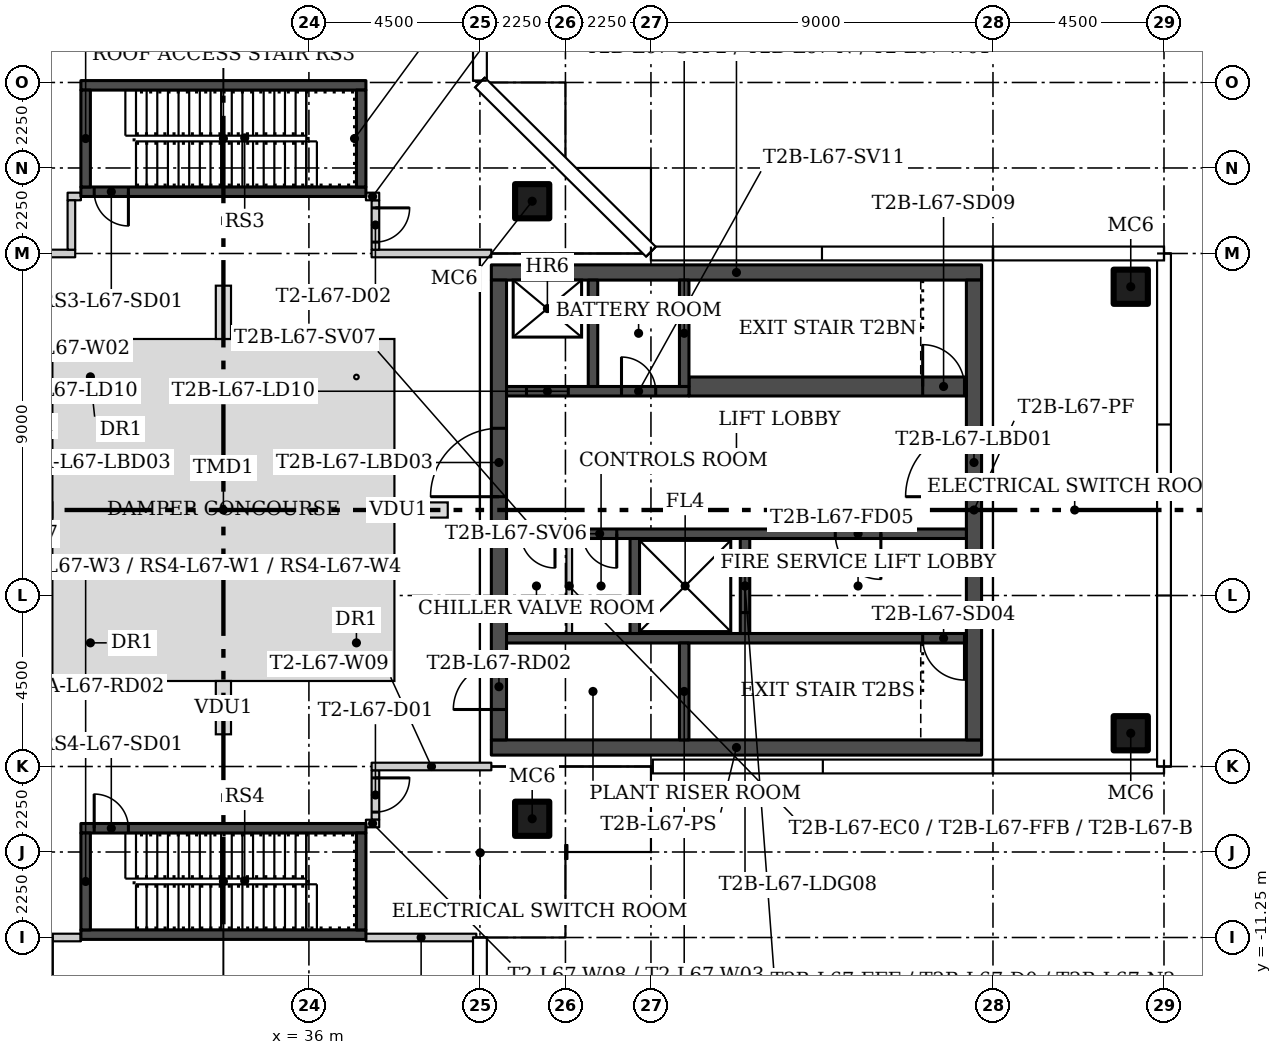
"""IFC4 building model, lengths in metres.
Left out: names, types, materials, properties, quantities, classifications, styles, units other than length and angle.
Written with IfcOpenShell. Run it as: python <this file> out.ifc"""

import sys

from ifc_helpers import new_model, si_unit, direction, frame, frame_2d, origin, origin_2d, place, context, subcontext, project, spatial, rectangle, hollow_rectangle, extrude, element, fill, save


model = new_model("IFC4")
c1 = context("Model", 3, precision=1e-05, world=origin(), true_north=direction((0.0, 1.0)))
c2 = subcontext(c1, "Body", "Model", "MODEL_VIEW")
j1 = project(units=[si_unit("LENGTHUNIT", "METRE"), si_unit("PLANEANGLEUNIT", "RADIAN")], contexts=[c1])
p1 = place(None, origin())
s1 = spatial("IfcSite", under=j1, at=p1, CompositionType="ELEMENT")
p2 = place(p1, origin())
s2 = spatial("IfcBuilding", under=s1, at=p2, CompositionType="ELEMENT")
p3 = place(p2, frame((0.0, 0.0, 278.3)))
s3 = spatial("IfcBuildingStorey", under=s2, at=p3, CompositionType="ELEMENT", Elevation=278.3)
for number, where in (
    (1, (41.875, 8.125, 0.0)),
    (2, (41.875, -8.125, 0.0)),
    (3, (57.625, -5.875, 0.0)),
    (4, (57.625, 5.875, 0.0)),
):
    element("IfcColumn", number, at=place(p3, frame(where)), inside=s3, PredefinedType="COLUMN", context=c2, shape_type="SweptSolid", body=[
        extrude(hollow_rectangle(XDim=0.9, YDim=0.9, WallThickness=0.036, at=origin_2d()), origin(), (0.0, 0.0, 1.0), 5.55),
    ])
for number, where in (
    (5, (37.65, 6.75, 0.0)),
    (6, (26.7, 6.75, 0.0)),
):
    element("IfcWall", number, at=place(p3, frame(where)), inside=s3, PredefinedType="PARTITIONING", context=c2, shape_type="SweptSolid", body=[
        extrude(rectangle(XDim=3.15, YDim=0.2, at=frame_2d((1.575, 0.0))), origin(), (0.0, 0.0, 1.0), 5.55),
    ])
p4 = place(p3, frame((37.75, -6.85, 0.0), z_axis=(0.0, 0.0, 1.0), x_axis=(0.0, -1.0, 0.0)))
e7 = element("IfcWall", 7, at=p4, inside=s3, PredefinedType="PARTITIONING", context=c2, shape_type="SweptSolid", body=[
    extrude(rectangle(XDim=1.3, YDim=0.2, at=frame_2d((0.65, 0.0))), origin(), (0.0, 0.0, 1.0), 5.55),
])
p5 = place(p4, frame((0.2, 0.0, 0.0)))
e8 = element("IfcOpeningElement", 8, at=p5, cuts=e7, PredefinedType="OPENING", context=c2, shape_type="SweptSolid", body=[
    extrude(rectangle(XDim=0.9, YDim=2.4, at=frame_2d((0.45, 1.2))), frame((0.0, 0.11, 0.0), z_axis=(0.0, -1.0, 0.0), x_axis=(1.0, 0.0, 0.0)), (0.0, 0.0, 1.0), 0.22),
])
p6 = place(p3, frame((37.75, 8.15, 0.0), z_axis=(0.0, 0.0, 1.0), x_axis=(0.0, -1.0, 0.0)))
e9 = element("IfcWall", 9, at=p6, inside=s3, PredefinedType="PARTITIONING", context=c2, shape_type="SweptSolid", body=[
    extrude(rectangle(XDim=1.3, YDim=0.2, at=frame_2d((0.65, 0.0))), origin(), (0.0, 0.0, 1.0), 5.55),
])
p7 = place(p6, frame((0.2, 0.0, 0.0)))
e10 = element("IfcOpeningElement", 10, at=p7, cuts=e9, PredefinedType="OPENING", context=c2, shape_type="SweptSolid", body=[
    extrude(rectangle(XDim=0.9, YDim=2.4, at=frame_2d((0.45, 1.2))), frame((0.0, 0.11, 0.0), z_axis=(0.0, -1.0, 0.0), x_axis=(1.0, 0.0, 0.0)), (0.0, 0.0, 1.0), 0.22),
])
for number, where in (
    (11, (37.5, 8.25, 0.0)),
    (12, (29.65, 8.25, 0.0)),
):
    element("IfcWall", number, at=place(p3, frame(where)), inside=s3, PredefinedType="PARTITIONING", context=c2, shape_type="SweptSolid", body=[
        extrude(rectangle(XDim=0.35, YDim=0.2, at=frame_2d((0.175, 0.0))), origin(), (0.0, 0.0, 1.0), 5.55),
    ])
p8 = place(p3, frame((29.75, 6.85, 0.0), z_axis=(0.0, 0.0, 1.0), x_axis=(0.0, 1.0, 0.0)))
e13 = element("IfcWall", 13, at=p8, inside=s3, PredefinedType="PARTITIONING", context=c2, shape_type="SweptSolid", body=[
    extrude(rectangle(XDim=1.3, YDim=0.2, at=frame_2d((0.65, 0.0))), origin(), (0.0, 0.0, 1.0), 5.55),
])
p9 = place(p3, frame((37.85, -8.25, 0.0), z_axis=(0.0, 0.0, 1.0), x_axis=(-1.0, 0.0, 0.0)))
e14 = element("IfcWall", 14, at=p9, inside=s3, PredefinedType="PARTITIONING", context=c2, shape_type="SweptSolid", body=[
    extrude(rectangle(XDim=0.35, YDim=0.2, at=frame_2d((0.175, 0.0))), origin(), (0.0, 0.0, 1.0), 5.55),
])
p10 = place(p3, frame((40.8, -6.75, 0.0), z_axis=(0.0, 0.0, 1.0), x_axis=(-1.0, 0.0, 0.0)))
e15 = element("IfcWall", 15, at=p10, inside=s3, PredefinedType="PARTITIONING", context=c2, shape_type="SweptSolid", body=[
    extrude(rectangle(XDim=3.15, YDim=0.2, at=frame_2d((1.575, 0.0))), origin(), (0.0, 0.0, 1.0), 5.55),
])
p11 = place(p3, frame((30.0, -11.25, 0.0), z_axis=(0.0, 0.0, 1.0), x_axis=(-1.0, 0.0, 0.0)))
e16 = element("IfcWall", 16, at=p11, inside=s3, PredefinedType="PARTITIONING", context=c2, shape_type="SweptSolid", body=[
    extrude(rectangle(XDim=3.005, YDim=0.2, at=frame_2d((1.502, 0.0))), origin(), (0.0, 0.0, 1.0), 5.55),
])
p12 = place(p11, frame((0.75, 0.0, 0.0)))
e17 = element("IfcOpeningElement", 17, at=p12, cuts=e16, PredefinedType="OPENING", context=c2, shape_type="SweptSolid", body=[
    extrude(rectangle(XDim=1.5, YDim=2.4, at=frame_2d((0.75, 1.2))), frame((0.0, 0.11, 0.0), z_axis=(0.0, -1.0, 0.0), x_axis=(1.0, 0.0, 0.0)), (0.0, 0.0, 1.0), 0.22),
])
p13 = place(p3, frame((37.5, -11.25, 0.0)))
e18 = element("IfcWall", 18, at=p13, inside=s3, PredefinedType="PARTITIONING", context=c2, shape_type="SweptSolid", body=[
    extrude(rectangle(XDim=2.905, YDim=0.2, at=frame_2d((1.453, 0.0))), origin(), (0.0, 0.0, 1.0), 5.55),
])
for number, where, z_axis, x_axis in (
    (19, (53.7, -6.25, 0.0), (0.0, 0.0, 1.0), (-1.0, 0.0, 0.0)),
    (20, (53.7, 6.25, 0.0), (0.0, 0.0, 1.0), (-1.0, 0.0, 0.0)),
):
    element("IfcWall", number, at=place(p3, frame(where, z_axis=z_axis, x_axis=x_axis)), inside=s3, PredefinedType="SHEAR", context=c2, shape_type="SweptSolid", body=[
        extrude(rectangle(XDim=12.9, YDim=0.4, at=frame_2d((6.45, 0.0))), origin(), (0.0, 0.0, 1.0), 5.55),
    ])
p14 = place(p3, frame((53.5, -6.05, 0.0), z_axis=(0.0, 0.0, 1.0), x_axis=(0.0, 1.0, 0.0)))
e21 = element("IfcWall", 21, at=p14, inside=s3, PredefinedType="SHEAR", context=c2, shape_type="SweptSolid", body=[
    extrude(rectangle(XDim=12.1, YDim=0.4, at=frame_2d((6.05, 0.0))), origin(), (0.0, 0.0, 1.0), 5.55),
])
p15 = place(p14, frame((6.4, 0.0, 0.0)))
e22 = element("IfcOpeningElement", 22, at=p15, cuts=e21, PredefinedType="OPENING", context=c2, shape_type="SweptSolid", body=[
    extrude(rectangle(XDim=1.8, YDim=2.4, at=frame_2d((0.9, 1.2))), frame((0.0, 0.21, 0.0), z_axis=(0.0, -1.0, 0.0), x_axis=(1.0, 0.0, 0.0)), (0.0, 0.0, 1.0), 0.42),
])
p16 = place(p3, frame((41.0, -6.05, 0.0), z_axis=(0.0, 0.0, 1.0), x_axis=(0.0, 1.0, 0.0)))
e23 = element("IfcWall", 23, at=p16, inside=s3, PredefinedType="SHEAR", context=c2, shape_type="SweptSolid", body=[
    extrude(rectangle(XDim=12.1, YDim=0.4, at=frame_2d((6.05, 0.0))), origin(), (0.0, 0.0, 1.0), 5.55),
])
p17 = place(p16, frame((0.8, 0.0, 0.0)))
e24 = element("IfcOpeningElement", 24, at=p17, cuts=e23, PredefinedType="OPENING", context=c2, shape_type="SweptSolid", body=[
    extrude(rectangle(XDim=1.2, YDim=2.1, at=frame_2d((0.6, 1.05))), frame((0.0, 0.21, 0.0), z_axis=(0.0, -1.0, 0.0), x_axis=(1.0, 0.0, 0.0)), (0.0, 0.0, 1.0), 0.42),
])
p18 = place(p16, frame((6.4, 0.0, 0.0)))
e25 = element("IfcOpeningElement", 25, at=p18, cuts=e23, PredefinedType="OPENING", context=c2, shape_type="SweptSolid", body=[
    extrude(rectangle(XDim=1.8, YDim=2.4, at=frame_2d((0.9, 1.2))), frame((0.0, 0.21, 0.0), z_axis=(0.0, -1.0, 0.0), x_axis=(1.0, 0.0, 0.0)), (0.0, 0.0, 1.0), 0.42),
])
p19 = place(p3, frame((53.3, -3.375, 0.0), z_axis=(0.0, 0.0, 1.0), x_axis=(-1.0, 0.0, 0.0)))
e26 = element("IfcWall", 26, at=p19, inside=s3, PredefinedType="SHEAR", context=c2, shape_type="SweptSolid", body=[
    extrude(rectangle(XDim=12.1, YDim=0.25, at=frame_2d((6.05, 0.0))), origin(), (0.0, 0.0, 1.0), 5.55),
])
p20 = place(p19, frame((0.05, 0.0, 0.0)))
e27 = element("IfcOpeningElement", 27, at=p20, cuts=e26, PredefinedType="OPENING", context=c2, shape_type="SweptSolid", body=[
    extrude(rectangle(XDim=1.1, YDim=2.1, at=frame_2d((0.55, 1.05))), frame((0.0, 0.135, 0.0), z_axis=(0.0, -1.0, 0.0), x_axis=(1.0, 0.0, 0.0)), (0.0, 0.0, 1.0), 0.27),
])
p21 = place(p3, frame((45.875, -6.05, 0.0), z_axis=(0.0, 0.0, 1.0), x_axis=(0.0, 1.0, 0.0)))
e28 = element("IfcWall", 28, at=p21, inside=s3, PredefinedType="SHEAR", context=c2, shape_type="SweptSolid", body=[
    extrude(rectangle(XDim=2.55, YDim=0.25, at=frame_2d((1.275, 0.0))), origin(), (0.0, 0.0, 1.0), 5.55),
])
p22 = place(p3, frame((53.3, -0.625, 0.0), z_axis=(0.0, 0.0, 1.0), x_axis=(-1.0, 0.0, 0.0)))
e29 = element("IfcWall", 29, at=p22, inside=s3, PredefinedType="SHEAR", context=c2, shape_type="SweptSolid", body=[
    extrude(rectangle(XDim=12.1, YDim=0.25, at=frame_2d((6.05, 0.0))), origin(), (0.0, 0.0, 1.0), 5.55),
])
p23 = place(p22, frame((2.25, 0.0, 0.0)))
e30 = element("IfcOpeningElement", 30, at=p23, cuts=e29, PredefinedType="OPENING", context=c2, shape_type="SweptSolid", body=[
    extrude(rectangle(XDim=1.2, YDim=2.1, at=frame_2d((0.6, 1.05))), frame((0.0, 0.135, 0.0), z_axis=(0.0, -1.0, 0.0), x_axis=(1.0, 0.0, 0.0)), (0.0, 0.0, 1.0), 0.27),
])
p24 = place(p22, frame((9.2, 0.0, 0.0)))
e31 = element("IfcOpeningElement", 31, at=p24, cuts=e29, PredefinedType="OPENING", context=c2, shape_type="SweptSolid", body=[
    extrude(rectangle(XDim=0.9, YDim=2.1, at=frame_2d((0.45, 1.05))), frame((0.0, 0.135, 0.0), z_axis=(0.0, -1.0, 0.0), x_axis=(1.0, 0.0, 0.0)), (0.0, 0.0, 1.0), 0.27),
])
p25 = place(p22, frame((10.825, 0.0, 0.0)))
e32 = element("IfcOpeningElement", 32, at=p25, cuts=e29, PredefinedType="OPENING", context=c2, shape_type="SweptSolid", body=[
    extrude(rectangle(XDim=0.9, YDim=2.1, at=frame_2d((0.45, 1.05))), frame((0.0, 0.135, 0.0), z_axis=(0.0, -1.0, 0.0), x_axis=(1.0, 0.0, 0.0)), (0.0, 0.0, 1.0), 0.27),
])
p26 = place(p3, frame((47.475, -3.25, 0.0), z_axis=(0.0, 0.0, 1.0), x_axis=(0.0, 1.0, 0.0)))
e33 = element("IfcWall", 33, at=p26, inside=s3, PredefinedType="SHEAR", context=c2, shape_type="SweptSolid", body=[
    extrude(rectangle(XDim=2.5, YDim=0.25, at=frame_2d((1.25, 0.0))), origin(), (0.0, 0.0, 1.0), 5.55),
])
p27 = place(p26, frame((0.55, 0.0, 0.0)))
e34 = element("IfcOpeningElement", 34, at=p27, cuts=e33, PredefinedType="OPENING", context=c2, shape_type="SweptSolid", body=[
    extrude(rectangle(XDim=1.4, YDim=2.4, at=frame_2d((0.7, 1.2))), frame((0.0, 0.135, 0.0), z_axis=(0.0, -1.0, 0.0), x_axis=(1.0, 0.0, 0.0)), (0.0, 0.0, 1.0), 0.27),
])
p28 = place(p3, frame((44.575, -3.25, 0.0), z_axis=(0.0, 0.0, 1.0), x_axis=(0.0, 1.0, 0.0)))
e35 = element("IfcWall", 35, at=p28, inside=s3, PredefinedType="SHEAR", context=c2, shape_type="SweptSolid", body=[
    extrude(rectangle(XDim=2.5, YDim=0.25, at=frame_2d((1.25, 0.0))), origin(), (0.0, 0.0, 1.0), 5.55),
])
p29 = place(p3, frame((42.85, -3.25, 0.0), z_axis=(0.0, 0.0, 1.0), x_axis=(0.0, 1.0, 0.0)))
e36 = element("IfcWall", 36, at=p29, inside=s3, PredefinedType="PARTITIONING", context=c2, shape_type="SweptSolid", body=[
    extrude(rectangle(XDim=2.5, YDim=0.15, at=frame_2d((1.25, 0.0))), origin(), (0.0, 0.0, 1.0), 5.55),
])
p30 = place(p3, frame((46.0, 3.25, 0.0)))
e37 = element("IfcWall", 37, at=p30, inside=s3, PredefinedType="SHEAR", context=c2, shape_type="SweptSolid", body=[
    extrude(rectangle(XDim=7.3, YDim=0.5, at=frame_2d((3.65, 0.0))), origin(), (0.0, 0.0, 1.0), 5.55),
])
p31 = place(p30, frame((6.15, 0.0, 0.0)))
e38 = element("IfcOpeningElement", 38, at=p31, cuts=e37, PredefinedType="OPENING", context=c2, shape_type="SweptSolid", body=[
    extrude(rectangle(XDim=1.1, YDim=2.1, at=frame_2d((0.55, 1.05))), frame((0.0, 0.26, 0.0), z_axis=(0.0, -1.0, 0.0), x_axis=(1.0, 0.0, 0.0)), (0.0, 0.0, 1.0), 0.52),
])
p32 = place(p3, frame((41.2, 3.125, 0.0)))
e39 = element("IfcWall", 39, at=p32, inside=s3, PredefinedType="SHEAR", context=c2, shape_type="SweptSolid", body=[
    extrude(rectangle(XDim=4.8, YDim=0.25, at=frame_2d((2.4, 0.0))), origin(), (0.0, 0.0, 1.0), 5.55),
])
p33 = place(p32, frame((0.525, 0.0, 0.0)))
e40 = element("IfcOpeningElement", 40, at=p33, cuts=e39, PredefinedType="OPENING", context=c2, shape_type="SweptSolid", body=[
    extrude(rectangle(XDim=1.1, YDim=2.1, at=frame_2d((0.55, 1.05))), frame((0.0, 0.135, 0.0), z_axis=(0.0, -1.0, 0.0), x_axis=(1.0, 0.0, 0.0)), (0.0, 0.0, 1.0), 0.27),
])
p34 = place(p32, frame((3.025, 0.0, 0.0)))
e41 = element("IfcOpeningElement", 41, at=p34, cuts=e39, PredefinedType="OPENING", context=c2, shape_type="SweptSolid", body=[
    extrude(rectangle(XDim=0.9, YDim=2.1, at=frame_2d((0.45, 1.05))), frame((0.0, 0.135, 0.0), z_axis=(0.0, -1.0, 0.0), x_axis=(1.0, 0.0, 0.0)), (0.0, 0.0, 1.0), 0.27),
])
for number, where, z_axis, x_axis in (
    (42, (45.875, 3.25, 0.0), (0.0, 0.0, 1.0), (0.0, 1.0, 0.0)),
    (43, (43.475, 3.25, 0.0), (0.0, 0.0, 1.0), (0.0, 1.0, 0.0)),
):
    element("IfcWall", number, at=place(p3, frame(where, z_axis=z_axis, x_axis=x_axis)), inside=s3, PredefinedType="SHEAR", context=c2, shape_type="SweptSolid", body=[
        extrude(rectangle(XDim=2.8, YDim=0.25, at=frame_2d((1.4, 0.0))), origin(), (0.0, 0.0, 1.0), 5.55),
    ])
p35 = place(p3, frame((37.5, 8.375, 0.0), z_axis=(0.0, 0.0, 1.0), x_axis=(-1.0, 0.0, 0.0)))
e44 = element("IfcWall", 44, at=p35, inside=s3, PredefinedType="SHEAR", context=c2, shape_type="SweptSolid", body=[
    extrude(rectangle(XDim=7.5, YDim=0.25, at=frame_2d((3.75, 0.0))), origin(), (0.0, 0.0, 1.0), 5.55),
])
p36 = place(p35, frame((6.25, 0.0, 0.0)))
e45 = element("IfcOpeningElement", 45, at=p36, cuts=e44, PredefinedType="OPENING", context=c2, shape_type="SweptSolid", body=[
    extrude(rectangle(XDim=0.9, YDim=2.1, at=frame_2d((0.45, 1.05))), frame((0.0, 0.135, 0.0), z_axis=(0.0, -1.0, 0.0), x_axis=(1.0, 0.0, 0.0)), (0.0, 0.0, 1.0), 0.27),
])
p37 = place(p3, frame((30.0, 11.175, 0.0)))
e46 = element("IfcWall", 46, at=p37, inside=s3, PredefinedType="SHEAR", context=c2, shape_type="SweptSolid", body=[
    extrude(rectangle(XDim=7.5, YDim=0.25, at=frame_2d((3.75, 0.0))), origin(), (0.0, 0.0, 1.0), 5.55),
])
for number, where, z_axis, x_axis in (
    (47, (30.125, 8.5, 0.0), (0.0, 0.0, 1.0), (0.0, 1.0, 0.0)),
    (48, (37.375, 8.5, 0.0), (0.0, 0.0, 1.0), (0.0, 1.0, 0.0)),
):
    element("IfcWall", number, at=place(p3, frame(where, z_axis=z_axis, x_axis=x_axis)), inside=s3, PredefinedType="SHEAR", context=c2, shape_type="SweptSolid", body=[
        extrude(rectangle(XDim=2.55, YDim=0.25, at=frame_2d((1.275, 0.0))), origin(), (0.0, 0.0, 1.0), 5.55),
    ])
p38 = place(p3, frame((30.0, -8.375, 0.0)))
e49 = element("IfcWall", 49, at=p38, inside=s3, PredefinedType="SHEAR", context=c2, shape_type="SweptSolid", body=[
    extrude(rectangle(XDim=7.5, YDim=0.25, at=frame_2d((3.75, 0.0))), origin(), (0.0, 0.0, 1.0), 5.55),
])
p39 = place(p38, frame((0.35, 0.0, 0.0)))
e50 = element("IfcOpeningElement", 50, at=p39, cuts=e49, PredefinedType="OPENING", context=c2, shape_type="SweptSolid", body=[
    extrude(rectangle(XDim=0.9, YDim=2.1, at=frame_2d((0.45, 1.05))), frame((0.0, 0.135, 0.0), z_axis=(0.0, -1.0, 0.0), x_axis=(1.0, 0.0, 0.0)), (0.0, 0.0, 1.0), 0.27),
])
p40 = place(p3, frame((30.0, -11.175, 0.0)))
e51 = element("IfcWall", 51, at=p40, inside=s3, PredefinedType="SHEAR", context=c2, shape_type="SweptSolid", body=[
    extrude(rectangle(XDim=7.5, YDim=0.25, at=frame_2d((3.75, 0.0))), origin(), (0.0, 0.0, 1.0), 5.55),
])
for number, where, z_axis, x_axis in (
    (52, (30.125, -11.05, 0.0), (0.0, 0.0, 1.0), (0.0, 1.0, 0.0)),
    (53, (37.375, -11.05, 0.0), (0.0, 0.0, 1.0), (0.0, 1.0, 0.0)),
):
    element("IfcWall", number, at=place(p3, frame(where, z_axis=z_axis, x_axis=x_axis)), inside=s3, PredefinedType="SHEAR", context=c2, shape_type="SweptSolid", body=[
        extrude(rectangle(XDim=2.55, YDim=0.25, at=frame_2d((1.275, 0.0))), origin(), (0.0, 0.0, 1.0), 5.55),
    ])
p41 = place(p5, origin())
e54 = element("IfcDoor", 54, at=p41, inside=s3, OperationType="SINGLE_SWING_LEFT", PredefinedType="DOOR", context=c2, shape_type="SweptSolid", body=[
    extrude(rectangle(XDim=0.9, YDim=2.4, at=frame_2d((0.45, 1.2))), frame((0.0, 0.025, 0.0), z_axis=(0.0, -1.0, 0.0), x_axis=(1.0, 0.0, 0.0)), (0.0, 0.0, 1.0), 0.05),
])
fill(e8, e54)
p42 = place(p7, origin())
e55 = element("IfcDoor", 55, at=p42, inside=s3, OperationType="SINGLE_SWING_LEFT", PredefinedType="DOOR", context=c2, shape_type="SweptSolid", body=[
    extrude(rectangle(XDim=0.9, YDim=2.4, at=frame_2d((0.45, 1.2))), frame((0.0, 0.025, 0.0), z_axis=(0.0, -1.0, 0.0), x_axis=(1.0, 0.0, 0.0)), (0.0, 0.0, 1.0), 0.05),
])
fill(e10, e55)
p43 = place(p15, origin())
e56 = element("IfcDoor", 56, at=p43, inside=s3, OperationType="DOUBLE_DOOR_SINGLE_SWING", PredefinedType="DOOR", context=c2, shape_type="SweptSolid", body=[
    extrude(rectangle(XDim=1.8, YDim=2.4, at=frame_2d((0.9, 1.2))), frame((0.0, 0.025, 0.0), z_axis=(0.0, -1.0, 0.0), x_axis=(1.0, 0.0, 0.0)), (0.0, 0.0, 1.0), 0.05),
])
fill(e22, e56)
p44 = place(p17, origin())
e57 = element("IfcDoor", 57, at=p44, inside=s3, OperationType="SINGLE_SWING_LEFT", PredefinedType="DOOR", context=c2, shape_type="SweptSolid", body=[
    extrude(rectangle(XDim=1.2, YDim=2.1, at=frame_2d((0.6, 1.05))), frame((0.0, 0.025, 0.0), z_axis=(0.0, -1.0, 0.0), x_axis=(1.0, 0.0, 0.0)), (0.0, 0.0, 1.0), 0.05),
])
fill(e24, e57)
p45 = place(p18, origin())
e58 = element("IfcDoor", 58, at=p45, inside=s3, OperationType="DOUBLE_DOOR_SINGLE_SWING", PredefinedType="DOOR", context=c2, shape_type="SweptSolid", body=[
    extrude(rectangle(XDim=1.8, YDim=2.4, at=frame_2d((0.9, 1.2))), frame((0.0, 0.025, 0.0), z_axis=(0.0, -1.0, 0.0), x_axis=(1.0, 0.0, 0.0)), (0.0, 0.0, 1.0), 0.05),
])
fill(e25, e58)
p46 = place(p20, origin())
e59 = element("IfcDoor", 59, at=p46, inside=s3, OperationType="SINGLE_SWING_LEFT", PredefinedType="DOOR", context=c2, shape_type="SweptSolid", body=[
    extrude(rectangle(XDim=1.1, YDim=2.1, at=frame_2d((0.55, 1.05))), frame((0.0, 0.025, 0.0), z_axis=(0.0, -1.0, 0.0), x_axis=(1.0, 0.0, 0.0)), (0.0, 0.0, 1.0), 0.05),
])
fill(e27, e59)
p47 = place(p23, origin())
e60 = element("IfcDoor", 60, at=p47, inside=s3, OperationType="SINGLE_SWING_LEFT", PredefinedType="DOOR", context=c2, shape_type="SweptSolid", body=[
    extrude(rectangle(XDim=1.2, YDim=2.1, at=frame_2d((0.6, 1.05))), frame((0.0, 0.025, 0.0), z_axis=(0.0, -1.0, 0.0), x_axis=(1.0, 0.0, 0.0)), (0.0, 0.0, 1.0), 0.05),
])
fill(e30, e60)
p48 = place(p24, origin())
e61 = element("IfcDoor", 61, at=p48, inside=s3, OperationType="SINGLE_SWING_RIGHT", PredefinedType="DOOR", context=c2, shape_type="SweptSolid", body=[
    extrude(rectangle(XDim=0.9, YDim=2.1, at=frame_2d((0.45, 1.05))), frame((0.0, 0.025, 0.0), z_axis=(0.0, -1.0, 0.0), x_axis=(1.0, 0.0, 0.0)), (0.0, 0.0, 1.0), 0.05),
])
fill(e31, e61)
p49 = place(p25, origin())
e62 = element("IfcDoor", 62, at=p49, inside=s3, OperationType="SINGLE_SWING_RIGHT", PredefinedType="DOOR", context=c2, shape_type="SweptSolid", body=[
    extrude(rectangle(XDim=0.9, YDim=2.1, at=frame_2d((0.45, 1.05))), frame((0.0, 0.025, 0.0), z_axis=(0.0, -1.0, 0.0), x_axis=(1.0, 0.0, 0.0)), (0.0, 0.0, 1.0), 0.05),
])
fill(e32, e62)
p50 = place(p27, origin())
e63 = element("IfcDoor", 63, at=p50, inside=s3, OperationType="SLIDING_TO_LEFT", PredefinedType="DOOR", context=c2, shape_type="SweptSolid", body=[
    extrude(rectangle(XDim=1.4, YDim=2.4, at=frame_2d((0.7, 1.2))), frame((0.0, 0.025, 0.0), z_axis=(0.0, -1.0, 0.0), x_axis=(1.0, 0.0, 0.0)), (0.0, 0.0, 1.0), 0.05),
])
fill(e34, e63)
p51 = place(p31, origin())
e64 = element("IfcDoor", 64, at=p51, inside=s3, OperationType="SINGLE_SWING_RIGHT", PredefinedType="DOOR", context=c2, shape_type="SweptSolid", body=[
    extrude(rectangle(XDim=1.1, YDim=2.1, at=frame_2d((0.55, 1.05))), frame((0.0, 0.025, 0.0), z_axis=(0.0, -1.0, 0.0), x_axis=(1.0, 0.0, 0.0)), (0.0, 0.0, 1.0), 0.05),
])
fill(e38, e64)
p52 = place(p33, origin())
e65 = element("IfcDoor", 65, at=p52, inside=s3, OperationType="SLIDING_TO_LEFT", PredefinedType="DOOR", context=c2, shape_type="SweptSolid", body=[
    extrude(rectangle(XDim=1.1, YDim=2.1, at=frame_2d((0.55, 1.05))), frame((0.0, 0.025, 0.0), z_axis=(0.0, -1.0, 0.0), x_axis=(1.0, 0.0, 0.0)), (0.0, 0.0, 1.0), 0.05),
])
fill(e40, e65)
p53 = place(p34, origin())
e66 = element("IfcDoor", 66, at=p53, inside=s3, OperationType="SINGLE_SWING_RIGHT", PredefinedType="DOOR", context=c2, shape_type="SweptSolid", body=[
    extrude(rectangle(XDim=0.9, YDim=2.1, at=frame_2d((0.45, 1.05))), frame((0.0, 0.025, 0.0), z_axis=(0.0, -1.0, 0.0), x_axis=(1.0, 0.0, 0.0)), (0.0, 0.0, 1.0), 0.05),
])
fill(e41, e66)
p54 = place(p36, origin())
e67 = element("IfcDoor", 67, at=p54, inside=s3, OperationType="SINGLE_SWING_RIGHT", PredefinedType="DOOR", context=c2, shape_type="SweptSolid", body=[
    extrude(rectangle(XDim=0.9, YDim=2.1, at=frame_2d((0.45, 1.05))), frame((0.0, 0.025, 0.0), z_axis=(0.0, -1.0, 0.0), x_axis=(1.0, 0.0, 0.0)), (0.0, 0.0, 1.0), 0.05),
])
fill(e45, e67)
p55 = place(p39, origin())
e68 = element("IfcDoor", 68, at=p55, inside=s3, OperationType="SINGLE_SWING_LEFT", PredefinedType="DOOR", context=c2, shape_type="SweptSolid", body=[
    extrude(rectangle(XDim=0.9, YDim=2.1, at=frame_2d((0.45, 1.05))), frame((0.0, 0.025, 0.0), z_axis=(0.0, -1.0, 0.0), x_axis=(1.0, 0.0, 0.0)), (0.0, 0.0, 1.0), 0.05),
])
fill(e50, e68)
save(model, sys.argv[1])
